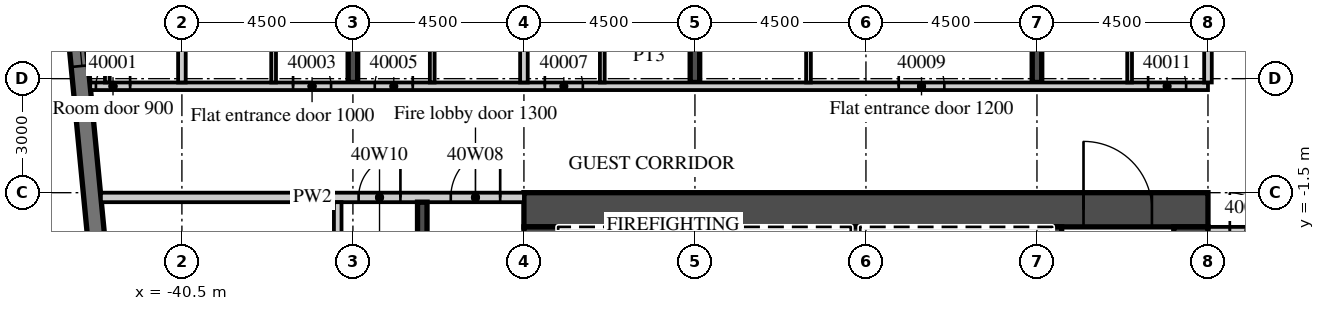
"""IFC4 building model, lengths in metres.
Left out: names, types, materials, properties, quantities, classifications, styles, units other than length and angle.
Written with IfcOpenShell. Run it as: python <this file> out.ifc"""

import sys

from ifc_helpers import new_model, si_unit, direction, frame, frame_2d, origin, place, context, subcontext, project, spatial, rectangle, extrude, element, fill, save


model = new_model("IFC4")
c1 = context("Model", 3, precision=1e-05, world=origin(), true_north=direction((0.0, 1.0)))
c2 = subcontext(c1, "Body", "Model", "MODEL_VIEW")
j1 = project(units=[si_unit("LENGTHUNIT", "METRE"), si_unit("PLANEANGLEUNIT", "RADIAN")], contexts=[c1])
p1 = place(None, origin())
s1 = spatial("IfcSite", under=j1, at=p1, CompositionType="ELEMENT")
p2 = place(p1, origin())
s2 = spatial("IfcBuilding", under=s1, at=p2, CompositionType="ELEMENT")
p3 = place(p2, frame((0.0, 0.0, 173.5)))
s3 = spatial("IfcBuildingStorey", under=s2, at=p3, CompositionType="ELEMENT", Elevation=173.5)
p4 = place(p3, frame((-36.0, 1.4, 0.0), z_axis=(0.0, 0.0, 1.0), x_axis=(0.0, 1.0, 0.0)))
e1 = element("IfcWall", 1, at=p4, inside=s3, PredefinedType="SHEAR", context=c2, shape_type="SweptSolid", body=[
    extrude(rectangle(XDim=15.401, YDim=0.25, at=frame_2d((7.701, 0.0))), origin(), (0.0, 0.0, 1.0), 3.3),
])
p5 = place(p3, frame((-27.0, 1.4, 0.0), z_axis=(0.0, 0.0, 1.0), x_axis=(0.0, 1.0, 0.0)))
e2 = element("IfcWall", 2, at=p5, inside=s3, PredefinedType="SHEAR", context=c2, shape_type="SweptSolid", body=[
    extrude(rectangle(XDim=16.268, YDim=0.25, at=frame_2d((8.134, 0.0))), origin(), (0.0, 0.0, 1.0), 3.3),
])
p6 = place(p3, frame((-18.0, 1.4, 0.0), z_axis=(0.0, 0.0, 1.0), x_axis=(0.0, 1.0, 0.0)))
e3 = element("IfcWall", 3, at=p6, inside=s3, PredefinedType="SHEAR", context=c2, shape_type="SweptSolid", body=[
    extrude(rectangle(XDim=17.134, YDim=0.25, at=frame_2d((8.567, 0.0))), origin(), (0.0, 0.0, 1.0), 3.3),
])
p7 = place(p3, frame((-44.214, 12.466, 0.0), z_axis=(0.0, 0.0, 1.0), x_axis=(0.095847314626, -0.995396047952, 0.0)))
e4 = element("IfcWall", 4, at=p7, inside=s3, PredefinedType="SOLIDWALL", context=c2, shape_type="SweptSolid", body=[
    extrude(rectangle(XDim=34.0, YDim=0.45, at=frame_2d((17.0, 0.0))), origin(), (0.0, 0.0, 1.0), 3.02),
])
p8 = place(p7, frame((2.865, 0.0, 0.45)))
e5 = element("IfcOpeningElement", 5, at=p8, cuts=e4, PredefinedType="OPENING", context=c2, shape_type="SweptSolid", body=[
    extrude(rectangle(XDim=3.3, YDim=2.25, at=frame_2d((1.65, 1.125))), frame((0.0, 0.235, 0.0), z_axis=(0.0, -1.0, 0.0), x_axis=(1.0, 0.0, 0.0)), (0.0, 0.0, 1.0), 0.47),
])
p9 = place(p7, frame((7.386, 0.0, 0.45)))
e6 = element("IfcOpeningElement", 6, at=p9, cuts=e4, PredefinedType="OPENING", context=c2, shape_type="SweptSolid", body=[
    extrude(rectangle(XDim=3.3, YDim=2.25, at=frame_2d((1.65, 1.125))), frame((0.0, 0.235, 0.0), z_axis=(0.0, -1.0, 0.0), x_axis=(1.0, 0.0, 0.0)), (0.0, 0.0, 1.0), 0.47),
])
p10 = place(p3, frame((-42.913, 1.3, 0.0), z_axis=(0.0, 0.0, 1.0), x_axis=(1.0, 0.0, 0.0)))
e7 = element("IfcWall", 7, at=p10, inside=s3, PredefinedType="PARTITIONING", context=c2, shape_type="SweptSolid", body=[
    extrude(rectangle(XDim=29.413, YDim=0.2, at=frame_2d((14.707, 0.0))), origin(), (0.0, 0.0, 1.0), 3.02),
])
p11 = place(p10, frame((0.15, 0.0, 0.0)))
e8 = element("IfcOpeningElement", 8, at=p11, cuts=e7, PredefinedType="OPENING", context=c2, shape_type="SweptSolid", body=[
    extrude(rectangle(XDim=0.9, YDim=2.1, at=frame_2d((0.45, 1.05))), frame((0.0, 0.11, 0.0), z_axis=(0.0, -1.0, 0.0), x_axis=(1.0, 0.0, 0.0)), (0.0, 0.0, 1.0), 0.22),
])
p12 = place(p10, frame((5.338, 0.0, 0.0)))
e9 = element("IfcOpeningElement", 9, at=p12, cuts=e7, PredefinedType="OPENING", context=c2, shape_type="SweptSolid", body=[
    extrude(rectangle(XDim=1.0, YDim=2.1, at=frame_2d((0.5, 1.05))), frame((0.0, 0.11, 0.0), z_axis=(0.0, -1.0, 0.0), x_axis=(1.0, 0.0, 0.0)), (0.0, 0.0, 1.0), 0.22),
])
p13 = place(p10, frame((7.488, 0.0, 0.0)))
e10 = element("IfcOpeningElement", 10, at=p13, cuts=e7, PredefinedType="OPENING", context=c2, shape_type="SweptSolid", body=[
    extrude(rectangle(XDim=1.0, YDim=2.1, at=frame_2d((0.5, 1.05))), frame((0.0, 0.11, 0.0), z_axis=(0.0, -1.0, 0.0), x_axis=(1.0, 0.0, 0.0)), (0.0, 0.0, 1.0), 0.22),
])
p14 = place(p10, frame((11.963, 0.0, 0.0)))
e11 = element("IfcOpeningElement", 11, at=p14, cuts=e7, PredefinedType="OPENING", context=c2, shape_type="SweptSolid", body=[
    extrude(rectangle(XDim=1.0, YDim=2.1, at=frame_2d((0.5, 1.05))), frame((0.0, 0.11, 0.0), z_axis=(0.0, -1.0, 0.0), x_axis=(1.0, 0.0, 0.0)), (0.0, 0.0, 1.0), 0.22),
])
p15 = place(p10, frame((21.275, 0.0, 0.0)))
e12 = element("IfcOpeningElement", 12, at=p15, cuts=e7, PredefinedType="OPENING", context=c2, shape_type="SweptSolid", body=[
    extrude(rectangle(XDim=1.2, YDim=2.1, at=frame_2d((0.6, 1.05))), frame((0.0, 0.11, 0.0), z_axis=(0.0, -1.0, 0.0), x_axis=(1.0, 0.0, 0.0)), (0.0, 0.0, 1.0), 0.22),
])
p16 = place(p10, frame((27.838, 0.0, 0.0)))
e13 = element("IfcOpeningElement", 13, at=p16, cuts=e7, PredefinedType="OPENING", context=c2, shape_type="SweptSolid", body=[
    extrude(rectangle(XDim=1.0, YDim=2.1, at=frame_2d((0.5, 1.05))), frame((0.0, 0.11, 0.0), z_axis=(0.0, -1.0, 0.0), x_axis=(1.0, 0.0, 0.0)), (0.0, 0.0, 1.0), 0.22),
])
p17 = place(p3, frame((-40.5, 1.4, 0.0), z_axis=(0.0, 0.0, 1.0), x_axis=(0.0, 1.0, 0.0)))
e14 = element("IfcWall", 14, at=p17, inside=s3, PredefinedType="PARTITIONING", context=c2, shape_type="SweptSolid", body=[
    extrude(rectangle(XDim=14.99, YDim=0.2, at=frame_2d((7.495, 0.0))), origin(), (0.0, 0.0, 1.0), 3.02),
])
p18 = place(p3, frame((-42.462, 1.4, 0.0), z_axis=(0.0, 0.0, 1.0), x_axis=(0.0, 1.0, 0.0)))
e15 = element("IfcWall", 15, at=p18, inside=s3, PredefinedType="PARTITIONING", context=c2, shape_type="SweptSolid", body=[
    extrude(rectangle(XDim=4.028, YDim=0.125, at=frame_2d((2.014, 0.0))), origin(), (0.0, 0.0, 1.0), 3.02),
])
p19 = place(p18, frame((2.45, 0.0, 0.0)))
e16 = element("IfcOpeningElement", 16, at=p19, cuts=e15, PredefinedType="OPENING", context=c2, shape_type="SweptSolid", body=[
    extrude(rectangle(XDim=0.9, YDim=2.1, at=frame_2d((0.45, 1.05))), frame((0.0, 0.073, 0.0), z_axis=(0.0, -1.0, 0.0), x_axis=(1.0, 0.0, 0.0)), (0.0, 0.0, 1.0), 0.145),
])
p20 = place(p3, frame((-38.087, 1.4, 0.0), z_axis=(0.0, 0.0, 1.0), x_axis=(0.0, 1.0, 0.0)))
e17 = element("IfcWall", 17, at=p20, inside=s3, PredefinedType="PARTITIONING", context=c2, shape_type="SweptSolid", body=[
    extrude(rectangle(XDim=5.725, YDim=0.125, at=frame_2d((2.863, 0.0))), origin(), (0.0, 0.0, 1.0), 3.02),
])
p21 = place(p20, frame((2.45, 0.0, 0.0)))
e18 = element("IfcOpeningElement", 18, at=p21, cuts=e17, PredefinedType="OPENING", context=c2, shape_type="SweptSolid", body=[
    extrude(rectangle(XDim=0.9, YDim=2.1, at=frame_2d((0.45, 1.05))), frame((0.0, 0.073, 0.0), z_axis=(0.0, -1.0, 0.0), x_axis=(1.0, 0.0, 0.0)), (0.0, 0.0, 1.0), 0.145),
])
p22 = place(p3, frame((-31.5, 1.4, 0.0), z_axis=(0.0, 0.0, 1.0), x_axis=(0.0, 1.0, 0.0)))
e19 = element("IfcWall", 19, at=p22, inside=s3, PredefinedType="PARTITIONING", context=c2, shape_type="SweptSolid", body=[
    extrude(rectangle(XDim=15.856, YDim=0.2, at=frame_2d((7.928, 0.0))), origin(), (0.0, 0.0, 1.0), 3.02),
])
p23 = place(p3, frame((-33.913, 1.4, 0.0), z_axis=(0.0, 0.0, 1.0), x_axis=(0.0, 1.0, 0.0)))
e20 = element("IfcWall", 20, at=p23, inside=s3, PredefinedType="PARTITIONING", context=c2, shape_type="SweptSolid", body=[
    extrude(rectangle(XDim=5.725, YDim=0.125, at=frame_2d((2.863, 0.0))), origin(), (0.0, 0.0, 1.0), 3.02),
])
p24 = place(p23, frame((2.45, 0.0, 0.0)))
e21 = element("IfcOpeningElement", 21, at=p24, cuts=e20, PredefinedType="OPENING", context=c2, shape_type="SweptSolid", body=[
    extrude(rectangle(XDim=0.9, YDim=2.1, at=frame_2d((0.45, 1.05))), frame((0.0, 0.073, 0.0), z_axis=(0.0, -1.0, 0.0), x_axis=(1.0, 0.0, 0.0)), (0.0, 0.0, 1.0), 0.145),
])
p25 = place(p3, frame((-29.438, 1.4, 0.0), z_axis=(0.0, 0.0, 1.0), x_axis=(0.0, 1.0, 0.0)))
e22 = element("IfcWall", 22, at=p25, inside=s3, PredefinedType="PARTITIONING", context=c2, shape_type="SweptSolid", body=[
    extrude(rectangle(XDim=5.725, YDim=0.125, at=frame_2d((2.863, 0.0))), origin(), (0.0, 0.0, 1.0), 3.02),
])
p26 = place(p25, frame((2.45, 0.0, 0.0)))
e23 = element("IfcOpeningElement", 23, at=p26, cuts=e22, PredefinedType="OPENING", context=c2, shape_type="SweptSolid", body=[
    extrude(rectangle(XDim=0.9, YDim=2.1, at=frame_2d((0.45, 1.05))), frame((0.0, 0.073, 0.0), z_axis=(0.0, -1.0, 0.0), x_axis=(1.0, 0.0, 0.0)), (0.0, 0.0, 1.0), 0.145),
])
p27 = place(p3, frame((-24.012, 1.4, 0.0), z_axis=(0.0, 0.0, 1.0), x_axis=(0.0, 1.0, 0.0)))
e24 = element("IfcWall", 24, at=p27, inside=s3, PredefinedType="PARTITIONING", context=c2, shape_type="SweptSolid", body=[
    extrude(rectangle(XDim=5.725, YDim=0.125, at=frame_2d((2.863, 0.0))), origin(), (0.0, 0.0, 1.0), 3.02),
])
p28 = place(p27, frame((2.45, 0.0, 0.0)))
e25 = element("IfcOpeningElement", 25, at=p28, cuts=e24, PredefinedType="OPENING", context=c2, shape_type="SweptSolid", body=[
    extrude(rectangle(XDim=0.9, YDim=2.1, at=frame_2d((0.45, 1.05))), frame((0.0, 0.073, 0.0), z_axis=(0.0, -1.0, 0.0), x_axis=(1.0, 0.0, 0.0)), (0.0, 0.0, 1.0), 0.145),
])
p29 = place(p3, frame((-13.5, 1.4, 0.0), z_axis=(0.0, 0.0, 1.0), x_axis=(0.0, 1.0, 0.0)))
e26 = element("IfcWall", 26, at=p29, inside=s3, PredefinedType="PARTITIONING", context=c2, shape_type="SweptSolid", body=[
    extrude(rectangle(XDim=17.59, YDim=0.2, at=frame_2d((8.795, 0.0))), origin(), (0.0, 0.0, 1.0), 3.02),
])
p30 = place(p3, frame((-15.562, 1.4, 0.0), z_axis=(0.0, 0.0, 1.0), x_axis=(0.0, 1.0, 0.0)))
e27 = element("IfcWall", 27, at=p30, inside=s3, PredefinedType="PARTITIONING", context=c2, shape_type="SweptSolid", body=[
    extrude(rectangle(XDim=5.725, YDim=0.125, at=frame_2d((2.863, 0.0))), origin(), (0.0, 0.0, 1.0), 3.02),
])
p31 = place(p30, frame((2.45, 0.0, 0.0)))
e28 = element("IfcOpeningElement", 28, at=p31, cuts=e27, PredefinedType="OPENING", context=c2, shape_type="SweptSolid", body=[
    extrude(rectangle(XDim=0.9, YDim=2.1, at=frame_2d((0.45, 1.05))), frame((0.0, 0.073, 0.0), z_axis=(0.0, -1.0, 0.0), x_axis=(1.0, 0.0, 0.0)), (0.0, 0.0, 1.0), 0.145),
])
p32 = place(p3, frame((-13.5, -2.5, 0.0), z_axis=(0.0, 0.0, 1.0), x_axis=(1.0, 0.0, 0.0)))
e29 = element("IfcWall", 29, at=p32, inside=s3, PredefinedType="PARTITIONING", context=c2, shape_type="SweptSolid", body=[
    extrude(rectangle(XDim=27.0, YDim=0.2, at=frame_2d((13.5, 0.0))), origin(), (0.0, 0.0, 1.0), 3.02),
])
p33 = place(p32, frame((0.575, 0.0, 0.0)))
e30 = element("IfcOpeningElement", 30, at=p33, cuts=e29, PredefinedType="OPENING", context=c2, shape_type="SweptSolid", body=[
    extrude(rectangle(XDim=1.0, YDim=2.1, at=frame_2d((0.5, 1.05))), frame((0.0, 0.11, 0.0), z_axis=(0.0, -1.0, 0.0), x_axis=(1.0, 0.0, 0.0)), (0.0, 0.0, 1.0), 0.22),
])
p34 = place(p32, frame((9.863, 0.0, 0.0)))
e31 = element("IfcOpeningElement", 31, at=p34, cuts=e29, PredefinedType="OPENING", context=c2, shape_type="SweptSolid", body=[
    extrude(rectangle(XDim=1.2, YDim=2.1, at=frame_2d((0.6, 1.05))), frame((0.0, 0.11, 0.0), z_axis=(0.0, -1.0, 0.0), x_axis=(1.0, 0.0, 0.0)), (0.0, 0.0, 1.0), 0.22),
])
p35 = place(p32, frame((15.938, 0.0, 0.0)))
e32 = element("IfcOpeningElement", 32, at=p35, cuts=e29, PredefinedType="OPENING", context=c2, shape_type="SweptSolid", body=[
    extrude(rectangle(XDim=1.2, YDim=2.1, at=frame_2d((0.6, 1.05))), frame((0.0, 0.11, 0.0), z_axis=(0.0, -1.0, 0.0), x_axis=(1.0, 0.0, 0.0)), (0.0, 0.0, 1.0), 0.22),
])
p36 = place(p32, frame((23.075, 0.0, 0.0)))
e33 = element("IfcOpeningElement", 33, at=p36, cuts=e29, PredefinedType="OPENING", context=c2, shape_type="SweptSolid", body=[
    extrude(rectangle(XDim=1.0, YDim=2.1, at=frame_2d((0.5, 1.05))), frame((0.0, 0.11, 0.0), z_axis=(0.0, -1.0, 0.0), x_axis=(1.0, 0.0, 0.0)), (0.0, 0.0, 1.0), 0.22),
])
p37 = place(p3, frame((-31.5, -1.95, 0.0), z_axis=(0.0, 0.0, 1.0), x_axis=(1.0, 0.0, 0.0)))
e34 = element("IfcWall", 34, at=p37, inside=s3, PredefinedType="SHEAR", context=c2, shape_type="SweptSolid", body=[
    extrude(rectangle(XDim=18.0, YDim=0.9, at=frame_2d((9.0, 0.0))), origin(), (0.0, 0.0, 1.0), 3.02),
])
p38 = place(p37, frame((14.725, 0.0, 0.0)))
e35 = element("IfcOpeningElement", 35, at=p38, cuts=e34, PredefinedType="OPENING", context=c2, shape_type="SweptSolid", body=[
    extrude(rectangle(XDim=1.8, YDim=2.1, at=frame_2d((0.9, 1.05))), frame((0.0, 0.46, 0.0), z_axis=(0.0, -1.0, 0.0), x_axis=(1.0, 0.0, 0.0)), (0.0, 0.0, 1.0), 0.92),
])
p39 = place(p3, frame((-31.05, -15.2, 0.0), z_axis=(0.0, 0.0, 1.0), x_axis=(0.0, 1.0, 0.0)))
e36 = element("IfcWall", 36, at=p39, inside=s3, PredefinedType="SHEAR", context=c2, shape_type="SweptSolid", body=[
    extrude(rectangle(XDim=12.8, YDim=0.9, at=frame_2d((6.4, 0.0))), origin(), (0.0, 0.0, 1.0), 3.02),
])
p40 = place(p39, frame((11.5, 0.0, 0.0)))
e37 = element("IfcOpeningElement", 37, at=p40, cuts=e36, PredefinedType="OPENING", context=c2, shape_type="SweptSolid", body=[
    extrude(rectangle(XDim=1.1, YDim=2.1, at=frame_2d((0.55, 1.05))), frame((0.0, 0.46, 0.0), z_axis=(0.0, -1.0, 0.0), x_axis=(1.0, 0.0, 0.0)), (0.0, 0.0, 1.0), 0.92),
])
p41 = place(p3, frame((-13.95, -14.6, 0.0), z_axis=(0.0, 0.0, 1.0), x_axis=(0.0, 1.0, 0.0)))
e38 = element("IfcWall", 38, at=p41, inside=s3, PredefinedType="SHEAR", context=c2, shape_type="SweptSolid", body=[
    extrude(rectangle(XDim=12.2, YDim=0.9, at=frame_2d((6.1, 0.0))), origin(), (0.0, 0.0, 1.0), 3.02),
])
p42 = place(p3, frame((-17.475, -5.55, 0.0), z_axis=(0.0, 0.0, 1.0), x_axis=(0.0, 1.0, 0.0)))
e39 = element("IfcWall", 39, at=p42, inside=s3, PredefinedType="SHEAR", context=c2, shape_type="SweptSolid", body=[
    extrude(rectangle(XDim=3.15, YDim=0.25, at=frame_2d((1.575, 0.0))), origin(), (0.0, 0.0, 1.0), 3.02),
])
for number, where, z_axis, x_axis in (
    (40, (-27.975, -5.3, 0.0), (0.0, 0.0, 1.0), (0.0, 1.0, 0.0)),
    (41, (-22.775, -5.3, 0.0), (0.0, 0.0, 1.0), (0.0, 1.0, 0.0)),
):
    element("IfcWall", number, at=place(p3, frame(where, z_axis=z_axis, x_axis=x_axis)), inside=s3, PredefinedType="SHEAR", context=c2, shape_type="SweptSolid", body=[
        extrude(rectangle(XDim=2.9, YDim=0.25, at=frame_2d((1.45, 0.0))), origin(), (0.0, 0.0, 1.0), 3.02),
    ])
p43 = place(p3, frame((-42.632, -1.625, 0.0), z_axis=(0.0, 0.0, 1.0), x_axis=(1.0, 0.0, 0.0)))
e42 = element("IfcWall", 42, at=p43, inside=s3, PredefinedType="PARTITIONING", context=c2, shape_type="SweptSolid", body=[
    extrude(rectangle(XDim=11.132, YDim=0.25, at=frame_2d((5.566, 0.0))), origin(), (0.0, 0.0, 1.0), 3.02),
])
p44 = place(p43, frame((9.207, 0.0, 0.0)))
e43 = element("IfcOpeningElement", 43, at=p44, cuts=e42, PredefinedType="OPENING", context=c2, shape_type="SweptSolid", body=[
    extrude(rectangle(XDim=1.3, YDim=2.1, at=frame_2d((0.65, 1.05))), frame((0.0, 0.135, 0.0), z_axis=(0.0, -1.0, 0.0), x_axis=(1.0, 0.0, 0.0)), (0.0, 0.0, 1.0), 0.27),
])
p45 = place(p43, frame((6.781, 0.0, 0.0)))
e44 = element("IfcOpeningElement", 44, at=p45, cuts=e42, PredefinedType="OPENING", context=c2, shape_type="SweptSolid", body=[
    extrude(rectangle(XDim=1.1, YDim=2.1, at=frame_2d((0.55, 1.05))), frame((0.0, 0.135, 0.0), z_axis=(0.0, -1.0, 0.0), x_axis=(1.0, 0.0, 0.0)), (0.0, 0.0, 1.0), 0.27),
])
p46 = place(p3, frame((-34.175, -10.1, 0.0), z_axis=(0.0, 0.0, 1.0), x_axis=(0.0, 1.0, 0.0)))
e45 = element("IfcWall", 45, at=p46, inside=s3, PredefinedType="SHEAR", context=c2, shape_type="SweptSolid", body=[
    extrude(rectangle(XDim=8.35, YDim=0.25, at=frame_2d((4.175, 0.0))), origin(), (0.0, 0.0, 1.0), 3.02),
])
p47 = place(p3, frame((-36.4, -17.7, 0.0), z_axis=(0.0, 0.0, 1.0), x_axis=(0.0, 1.0, 0.0)))
e46 = element("IfcWall", 46, at=p47, inside=s3, PredefinedType="PARTITIONING", context=c2, shape_type="SweptSolid", body=[
    extrude(rectangle(XDim=15.95, YDim=0.2, at=frame_2d((7.975, 0.0))), origin(), (0.0, 0.0, 1.0), 3.02),
])
p48 = place(p47, frame((0.35, 0.0, 0.0)))
e47 = element("IfcOpeningElement", 47, at=p48, cuts=e46, PredefinedType="OPENING", context=c2, shape_type="SweptSolid", body=[
    extrude(rectangle(XDim=0.9, YDim=2.1, at=frame_2d((0.45, 1.05))), frame((0.0, 0.11, 0.0), z_axis=(0.0, -1.0, 0.0), x_axis=(1.0, 0.0, 0.0)), (0.0, 0.0, 1.0), 0.22),
])
p49 = place(p9, origin())
e48 = element("IfcWindow", 48, at=p49, inside=s3, PartitioningType="SINGLE_PANEL", PredefinedType="WINDOW", context=c2, shape_type="SweptSolid", body=[
    extrude(rectangle(XDim=3.3, YDim=2.25, at=frame_2d((1.65, 1.125))), frame((0.0, 0.09, 0.0), z_axis=(0.0, -1.0, 0.0), x_axis=(1.0, 0.0, 0.0)), (0.0, 0.0, 1.0), 0.06),
])
fill(e6, e48)
p50 = place(p11, origin())
e49 = element("IfcDoor", 49, at=p50, inside=s3, OperationType="SINGLE_SWING_RIGHT", PredefinedType="DOOR", context=c2, shape_type="SweptSolid", body=[
    extrude(rectangle(XDim=0.9, YDim=2.1, at=frame_2d((0.45, 1.05))), frame((0.0, 0.025, 0.0), z_axis=(0.0, -1.0, 0.0), x_axis=(1.0, 0.0, 0.0)), (0.0, 0.0, 1.0), 0.05),
])
fill(e8, e49)
p51 = place(p12, origin())
e50 = element("IfcDoor", 50, at=p51, inside=s3, OperationType="SINGLE_SWING_LEFT", PredefinedType="DOOR", context=c2, shape_type="SweptSolid", body=[
    extrude(rectangle(XDim=1.0, YDim=2.1, at=frame_2d((0.5, 1.05))), frame((0.0, 0.025, 0.0), z_axis=(0.0, -1.0, 0.0), x_axis=(1.0, 0.0, 0.0)), (0.0, 0.0, 1.0), 0.05),
])
fill(e9, e50)
p52 = place(p13, origin())
e51 = element("IfcDoor", 51, at=p52, inside=s3, OperationType="SINGLE_SWING_RIGHT", PredefinedType="DOOR", context=c2, shape_type="SweptSolid", body=[
    extrude(rectangle(XDim=1.0, YDim=2.1, at=frame_2d((0.5, 1.05))), frame((0.0, 0.025, 0.0), z_axis=(0.0, -1.0, 0.0), x_axis=(1.0, 0.0, 0.0)), (0.0, 0.0, 1.0), 0.05),
])
fill(e10, e51)
p53 = place(p14, origin())
e52 = element("IfcDoor", 52, at=p53, inside=s3, OperationType="SINGLE_SWING_LEFT", PredefinedType="DOOR", context=c2, shape_type="SweptSolid", body=[
    extrude(rectangle(XDim=1.0, YDim=2.1, at=frame_2d((0.5, 1.05))), frame((0.0, 0.025, 0.0), z_axis=(0.0, -1.0, 0.0), x_axis=(1.0, 0.0, 0.0)), (0.0, 0.0, 1.0), 0.05),
])
fill(e11, e52)
p54 = place(p15, origin())
e53 = element("IfcDoor", 53, at=p54, inside=s3, OperationType="SINGLE_SWING_LEFT", PredefinedType="DOOR", context=c2, shape_type="SweptSolid", body=[
    extrude(rectangle(XDim=1.2, YDim=2.1, at=frame_2d((0.6, 1.05))), frame((0.0, 0.025, 0.0), z_axis=(0.0, -1.0, 0.0), x_axis=(1.0, 0.0, 0.0)), (0.0, 0.0, 1.0), 0.05),
])
fill(e12, e53)
p55 = place(p16, origin())
e54 = element("IfcDoor", 54, at=p55, inside=s3, OperationType="SINGLE_SWING_LEFT", PredefinedType="DOOR", context=c2, shape_type="SweptSolid", body=[
    extrude(rectangle(XDim=1.0, YDim=2.1, at=frame_2d((0.5, 1.05))), frame((0.0, 0.025, 0.0), z_axis=(0.0, -1.0, 0.0), x_axis=(1.0, 0.0, 0.0)), (0.0, 0.0, 1.0), 0.05),
])
fill(e13, e54)
p56 = place(p33, origin())
e55 = element("IfcDoor", 55, at=p56, inside=s3, OperationType="SINGLE_SWING_LEFT", PredefinedType="DOOR", context=c2, shape_type="SweptSolid", body=[
    extrude(rectangle(XDim=1.0, YDim=2.1, at=frame_2d((0.5, 1.05))), frame((0.0, 0.025, 0.0), z_axis=(0.0, -1.0, 0.0), x_axis=(1.0, 0.0, 0.0)), (0.0, 0.0, 1.0), 0.05),
])
fill(e30, e55)
p57 = place(p38, origin())
e56 = element("IfcDoor", 56, at=p57, inside=s3, OperationType="DOUBLE_DOOR_DOUBLE_SWING", PredefinedType="DOOR", context=c2, shape_type="SweptSolid", body=[
    extrude(rectangle(XDim=1.8, YDim=2.1, at=frame_2d((0.9, 1.05))), frame((0.0, 0.025, 0.0), z_axis=(0.0, -1.0, 0.0), x_axis=(1.0, 0.0, 0.0)), (0.0, 0.0, 1.0), 0.05),
])
fill(e35, e56)
p58 = place(p44, origin())
e57 = element("IfcDoor", 57, at=p58, inside=s3, OperationType="SINGLE_SWING_RIGHT", PredefinedType="DOOR", context=c2, shape_type="SweptSolid", body=[
    extrude(rectangle(XDim=1.3, YDim=2.1, at=frame_2d((0.65, 1.05))), frame((0.0, 0.025, 0.0), z_axis=(0.0, -1.0, 0.0), x_axis=(1.0, 0.0, 0.0)), (0.0, 0.0, 1.0), 0.05),
])
fill(e43, e57)
p59 = place(p45, origin())
e58 = element("IfcDoor", 58, at=p59, inside=s3, OperationType="SINGLE_SWING_RIGHT", PredefinedType="DOOR", context=c2, shape_type="SweptSolid", body=[
    extrude(rectangle(XDim=1.1, YDim=2.1, at=frame_2d((0.55, 1.05))), frame((0.0, 0.025, 0.0), z_axis=(0.0, -1.0, 0.0), x_axis=(1.0, 0.0, 0.0)), (0.0, 0.0, 1.0), 0.05),
])
fill(e44, e58)
save(model, sys.argv[1])
